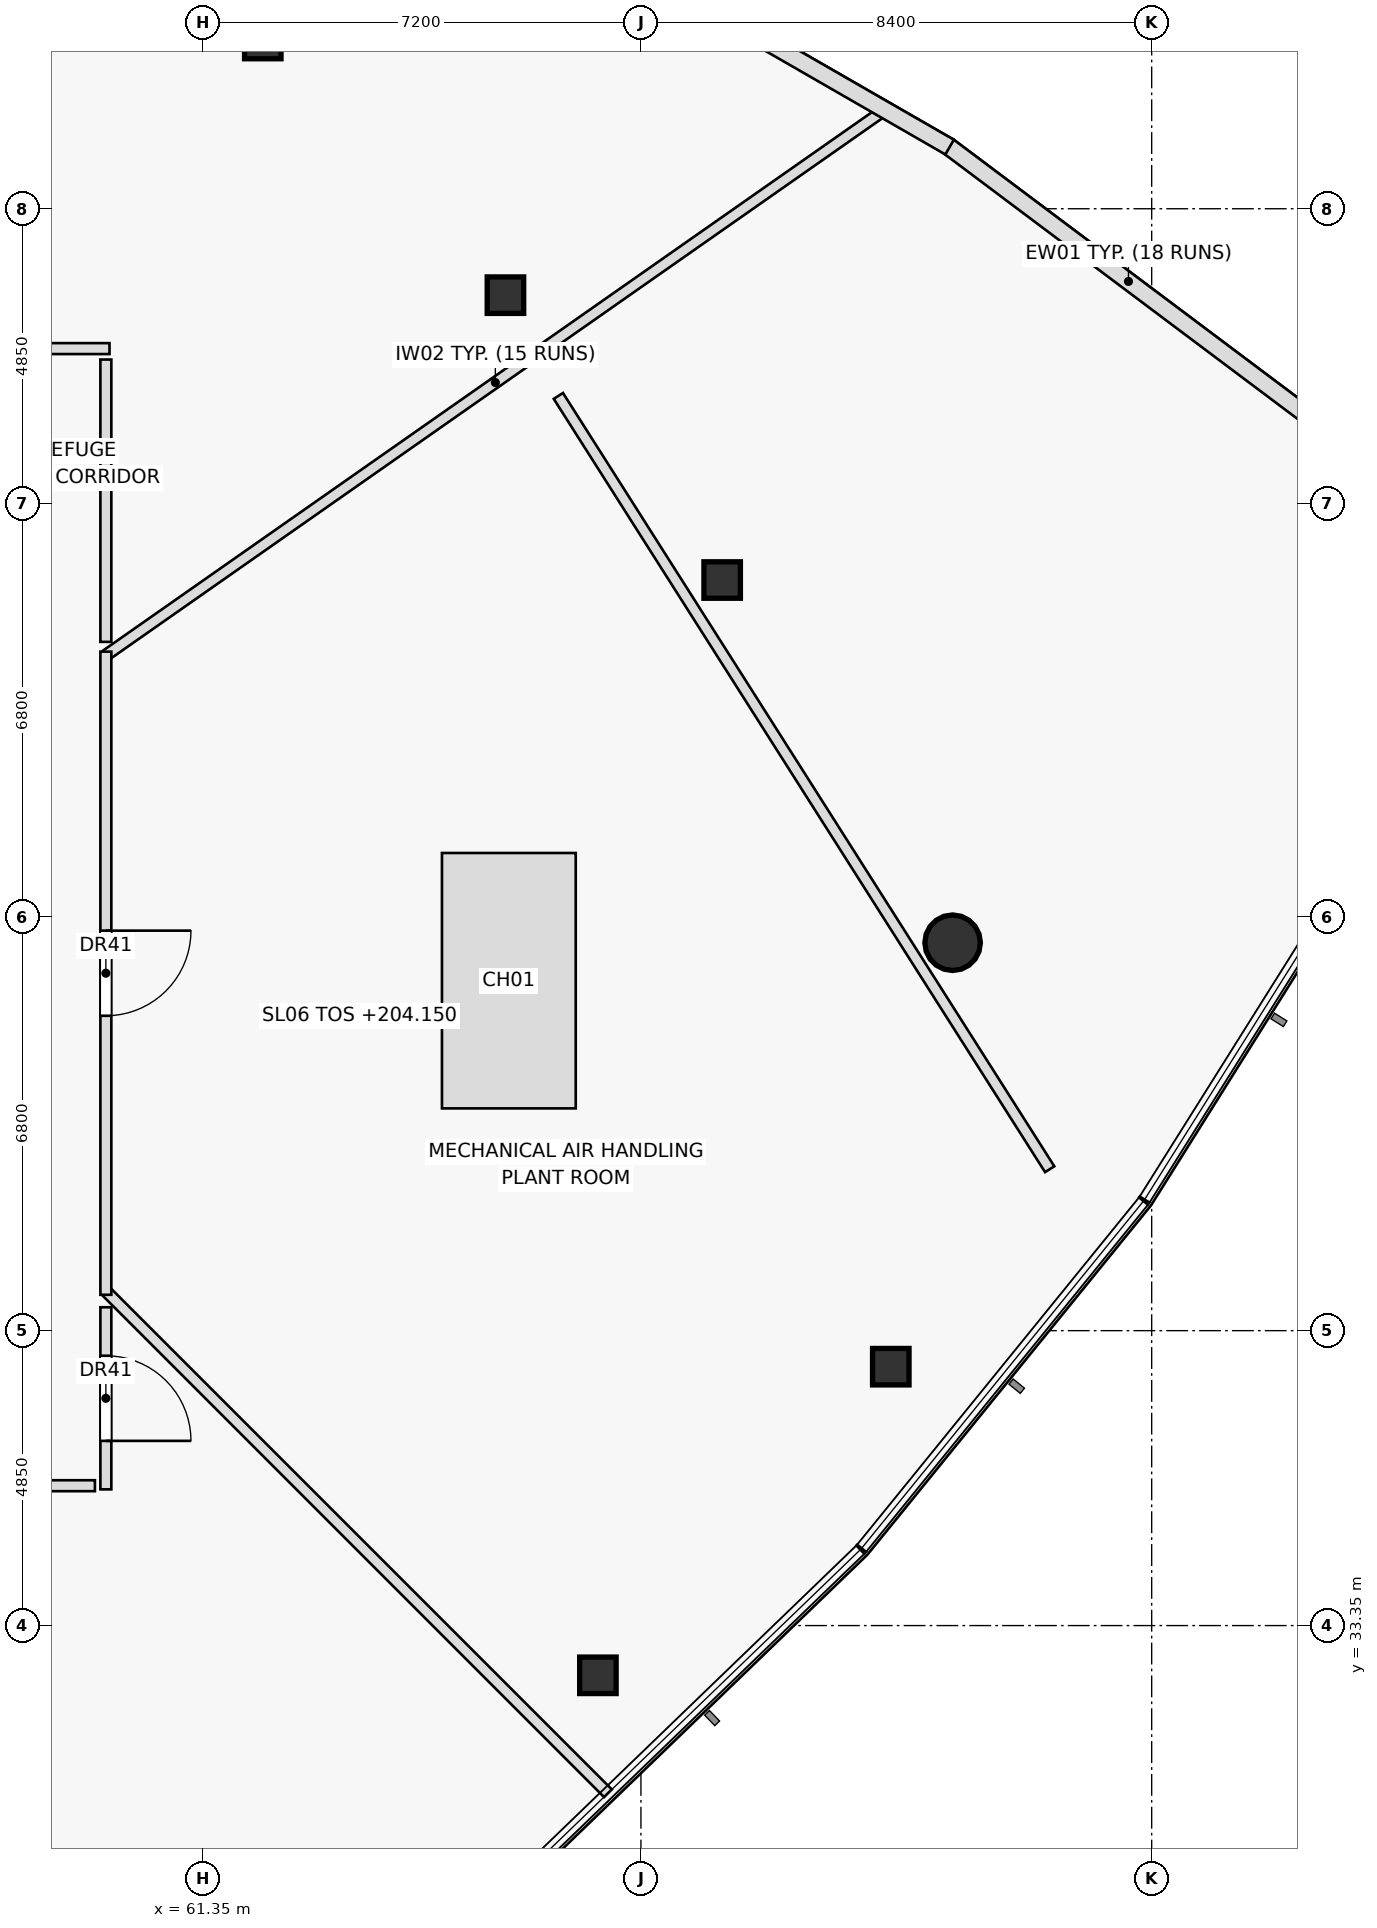
"""IFC4 building model, lengths in metres.
Left out: names, types, materials, properties, quantities, classifications, styles, units other than length and angle.
Written with IfcOpenShell. Run it as: python <this file> out.ifc"""

import sys

from ifc_helpers import new_model, si_unit, direction, frame, frame_2d, origin, origin_2d, place, context, subcontext, project, spatial, rectangle, hollow_rectangle, hollow_circle, extrude, element, fill, save


model = new_model("IFC4")
c1 = context("Model", 3, precision=1e-05, world=origin(), true_north=direction((0.0, 1.0)))
c2 = subcontext(c1, "Body", "Model", "MODEL_VIEW")
j1 = project(units=[si_unit("LENGTHUNIT", "METRE"), si_unit("PLANEANGLEUNIT", "RADIAN")], contexts=[c1])
p1 = place(None, origin())
s1 = spatial("IfcSite", under=j1, at=p1, CompositionType="ELEMENT")
p2 = place(p1, origin())
s2 = spatial("IfcBuilding", under=s1, at=p2, CompositionType="ELEMENT")
p3 = place(p2, frame((0.0, 0.0, 204.15)))
s3 = spatial("IfcBuildingStorey", under=s2, at=p3, CompositionType="ELEMENT", Elevation=204.15)
for number, where, z_axis, x_axis in (
    (1, (67.842, 32.532, 0.0), (0.0, 0.0, 1.0), (1.0, 0.0, 0.0)),
    (2, (72.659, 37.607, 0.0), (0.0, 0.0, 1.0), (1.0, 0.0, 0.0)),
):
    element("IfcColumn", number, at=place(p3, frame(where, z_axis=z_axis, x_axis=x_axis)), inside=s3, PredefinedType="COLUMN", context=c2, shape_type="SweptSolid", body=[
        extrude(hollow_rectangle(XDim=0.6, YDim=0.6, WallThickness=0.036, at=origin_2d()), origin(), (0.0, 0.0, 1.0), 5.0),
    ])
p4 = place(p3, frame((73.676, 44.58, 0.0), z_axis=(0.0, 0.0, 1.0), x_axis=(1.0, 0.0, 0.0)))
e3 = element("IfcColumn", 3, at=p4, inside=s3, PredefinedType="COLUMN", context=c2, shape_type="SweptSolid", body=[
    extrude(hollow_circle(Radius=0.457, WallThickness=0.04, at=origin_2d()), origin(), (0.0, 0.0, 1.0), 5.0),
])
for number, where, z_axis, x_axis in (
    (4, (69.886, 50.544, 0.0), (0.0, 0.0, 1.0), (1.0, 0.0, 0.0)),
    (5, (66.322, 55.229, 0.0), (0.0, 0.0, 1.0), (1.0, 0.0, 0.0)),
    (6, (62.331, 59.416, 0.0), (0.0, 0.0, 1.0), (1.0, 0.0, 0.0)),
):
    element("IfcColumn", number, at=place(p3, frame(where, z_axis=z_axis, x_axis=x_axis)), inside=s3, PredefinedType="COLUMN", context=c2, shape_type="SweptSolid", body=[
        extrude(hollow_rectangle(XDim=0.6, YDim=0.6, WallThickness=0.036, at=origin_2d()), origin(), (0.0, 0.0, 1.0), 4.55),
    ])
p5 = place(p3, frame((75.272, 40.855, 0.0), z_axis=(0.0, 0.0, 1.0), x_axis=(-0.536280870182, 0.844039589283, 0.0)))
e7 = element("IfcWall", 7, at=p5, inside=s3, PredefinedType="PARTITIONING", context=c2, shape_type="SweptSolid", body=[
    extrude(rectangle(XDim=15.067, YDim=0.18, at=frame_2d((7.533, 0.0))), origin(), (0.0, 0.0, 1.0), 3.935),
])
p6 = place(p3, frame((59.75, 49.306, 0.0), z_axis=(0.0, 0.0, 1.0), x_axis=(0.819154908889, 0.573572345256, 0.0)))
e8 = element("IfcWall", 8, at=p6, inside=s3, PredefinedType="PARTITIONING", context=c2, shape_type="SweptSolid", body=[
    extrude(rectangle(XDim=15.64, YDim=0.18, at=frame_2d((7.82, 0.0))), origin(), (0.0, 0.0, 1.0), 3.935),
])
p7 = place(p3, frame((59.75, 38.85, 0.0), z_axis=(0.0, 0.0, 1.0), x_axis=(0.707106781187, -0.707106781187, 0.0)))
e9 = element("IfcWall", 9, at=p7, inside=s3, PredefinedType="PARTITIONING", context=c2, shape_type="SweptSolid", body=[
    extrude(rectangle(XDim=11.678, YDim=0.18, at=frame_2d((5.839, 0.0))), origin(), (0.0, 0.0, 1.0), 3.935),
])
p8 = place(p3, frame((54.29, 54.35, 0.0), z_axis=(0.0, 0.0, 1.0), x_axis=(1.0, 0.0, 0.0)))
e10 = element("IfcWall", 10, at=p8, inside=s3, PredefinedType="PARTITIONING", context=c2, shape_type="SweptSolid", body=[
    extrude(rectangle(XDim=5.52, YDim=0.18, at=frame_2d((2.76, 0.0))), origin(), (0.0, 0.0, 1.0), 3.935),
])
p9 = place(p8, frame((2.06, 0.0, 0.0)))
e11 = element("IfcOpeningElement", 11, at=p9, cuts=e10, PredefinedType="OPENING", context=c2, shape_type="SweptSolid", body=[
    extrude(rectangle(XDim=1.4, YDim=2.15, at=frame_2d((0.7, 1.075))), frame((0.0, 0.1, 0.0), z_axis=(0.0, -1.0, 0.0), x_axis=(1.0, 0.0, 0.0)), (0.0, 0.0, 1.0), 0.2),
])
p10 = place(p3, frame((59.75, 54.17, 0.0), z_axis=(0.0, 0.0, 1.0), x_axis=(0.0, -1.0, 0.0)))
e12 = element("IfcWall", 12, at=p10, inside=s3, PredefinedType="PARTITIONING", context=c2, shape_type="SweptSolid", body=[
    extrude(rectangle(XDim=4.643, YDim=0.18, at=frame_2d((2.321, 0.0))), origin(), (0.0, 0.0, 1.0), 3.935),
])
p11 = place(p3, frame((59.75, 49.366, 0.0), z_axis=(0.0, 0.0, 1.0), x_axis=(0.0, -1.0, 0.0)))
e13 = element("IfcWall", 13, at=p11, inside=s3, PredefinedType="PARTITIONING", context=c2, shape_type="SweptSolid", body=[
    extrude(rectangle(XDim=10.576, YDim=0.18, at=frame_2d((5.288, 0.0))), origin(), (0.0, 0.0, 1.0), 3.935),
])
p12 = place(p11, frame((4.588, 0.0, 0.0)))
e14 = element("IfcOpeningElement", 14, at=p12, cuts=e13, PredefinedType="OPENING", context=c2, shape_type="SweptSolid", body=[
    extrude(rectangle(XDim=1.4, YDim=2.15, at=frame_2d((0.7, 1.075))), frame((0.0, 0.1, 0.0), z_axis=(0.0, -1.0, 0.0), x_axis=(1.0, 0.0, 0.0)), (0.0, 0.0, 1.0), 0.2),
])
p13 = place(p3, frame((59.75, 38.585, 0.0), z_axis=(0.0, 0.0, 1.0), x_axis=(0.0, -1.0, 0.0)))
e15 = element("IfcWall", 15, at=p13, inside=s3, PredefinedType="PARTITIONING", context=c2, shape_type="SweptSolid", body=[
    extrude(rectangle(XDim=2.995, YDim=0.18, at=frame_2d((1.497, 0.0))), origin(), (0.0, 0.0, 1.0), 3.935),
])
p14 = place(p13, frame((0.797, 0.0, 0.0)))
e16 = element("IfcOpeningElement", 16, at=p14, cuts=e15, PredefinedType="OPENING", context=c2, shape_type="SweptSolid", body=[
    extrude(rectangle(XDim=1.4, YDim=2.15, at=frame_2d((0.7, 1.075))), frame((0.0, 0.1, 0.0), z_axis=(0.0, -1.0, 0.0), x_axis=(1.0, 0.0, 0.0)), (0.0, 0.0, 1.0), 0.2),
])
p15 = place(p3, frame((59.57, 35.65, 0.0), z_axis=(0.0, 0.0, 1.0), x_axis=(-1.0, 0.0, 0.0)))
e17 = element("IfcWall", 17, at=p15, inside=s3, PredefinedType="PARTITIONING", context=c2, shape_type="SweptSolid", body=[
    extrude(rectangle(XDim=13.58, YDim=0.18, at=frame_2d((6.79, 0.0))), origin(), (0.0, 0.0, 1.0), 3.935),
])
p16 = place(p3, frame((79.534, 53.229, 0.0), z_axis=(0.0, 0.0, 1.0), x_axis=(-0.799920988523, 0.600105334188, 0.0)))
e18 = element("IfcWall", 18, at=p16, inside=s3, PredefinedType="STANDARD", context=c2, shape_type="SweptSolid", body=[
    extrude(rectangle(XDim=7.417, YDim=0.28, at=frame_2d((3.708, 0.0))), origin(), (0.0, 0.0, 1.0), 4.55),
])
p17 = place(p3, frame((73.627, 57.664, 0.0), z_axis=(0.0, 0.0, 1.0), x_axis=(-0.86667040833, 0.498881151504, 0.0)))
e19 = element("IfcWall", 19, at=p17, inside=s3, PredefinedType="STANDARD", context=c2, shape_type="SweptSolid", body=[
    extrude(rectangle(XDim=7.405, YDim=0.28, at=frame_2d((3.702, 0.0))), origin(), (0.0, 0.0, 1.0), 4.55),
])
p18 = place(p12, origin())
e20 = element("IfcDoor", 20, at=p18, inside=s3, OperationType="SINGLE_SWING_LEFT", PredefinedType="DOOR", context=c2, shape_type="SweptSolid", body=[
    extrude(rectangle(XDim=1.4, YDim=2.15, at=frame_2d((0.7, 1.075))), frame((0.0, 0.025, 0.0), z_axis=(0.0, -1.0, 0.0), x_axis=(1.0, 0.0, 0.0)), (0.0, 0.0, 1.0), 0.05),
])
fill(e14, e20)
p19 = place(p14, origin())
e21 = element("IfcDoor", 21, at=p19, inside=s3, OperationType="SINGLE_SWING_RIGHT", PredefinedType="DOOR", context=c2, shape_type="SweptSolid", body=[
    extrude(rectangle(XDim=1.4, YDim=2.15, at=frame_2d((0.7, 1.075))), frame((0.0, 0.025, 0.0), z_axis=(0.0, -1.0, 0.0), x_axis=(1.0, 0.0, 0.0)), (0.0, 0.0, 1.0), 0.05),
])
fill(e16, e21)
save(model, sys.argv[1])
